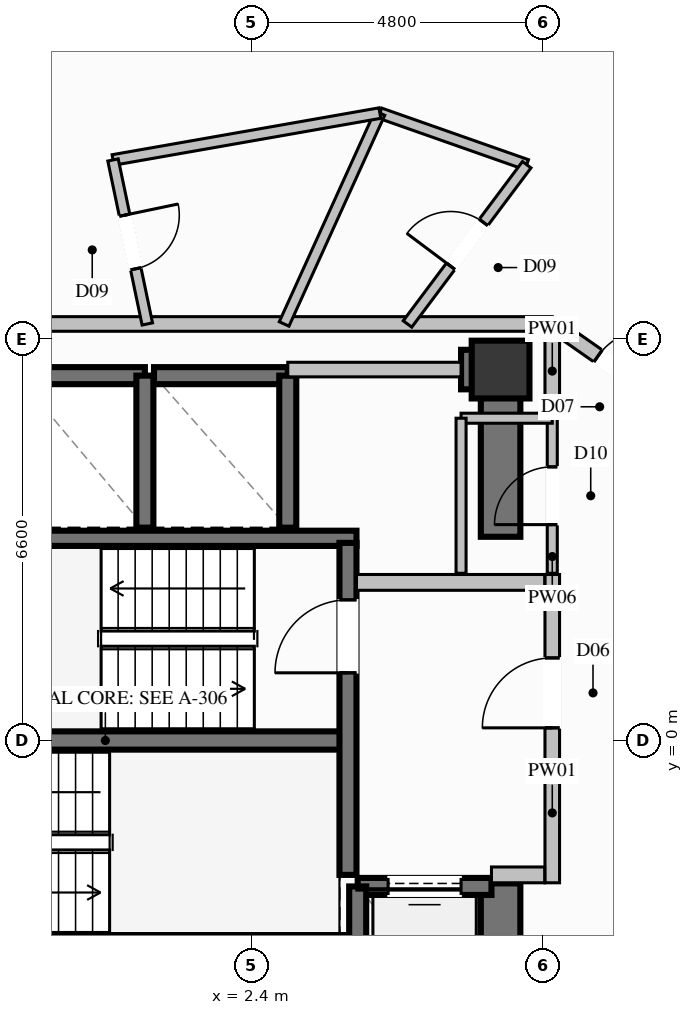
"""IFC4 building model, lengths in metres.
Left out: names, types, materials, properties, quantities, classifications, styles, units other than length and angle.
Written with IfcOpenShell. Run it as: python <this file> out.ifc"""

import sys

from ifc_helpers import new_model, si_unit, direction, frame, frame_2d, origin, origin_2d, place, context, subcontext, project, spatial, rectangle, extrude, element, fill, save


model = new_model("IFC4")
c1 = context("Model", 3, precision=1e-05, world=origin(), true_north=direction((0.0, 1.0)))
c2 = subcontext(c1, "Body", "Model", "MODEL_VIEW")
j1 = project(units=[si_unit("LENGTHUNIT", "METRE"), si_unit("PLANEANGLEUNIT", "RADIAN")], contexts=[c1])
p1 = place(None, origin())
s1 = spatial("IfcSite", under=j1, at=p1, CompositionType="ELEMENT")
p2 = place(p1, origin())
s2 = spatial("IfcBuilding", under=s1, at=p2, CompositionType="ELEMENT")
p3 = place(p2, frame((0.0, 0.0, 145.8)))
s3 = spatial("IfcBuildingStorey", under=s2, at=p3, CompositionType="ELEMENT", Elevation=145.8)
p4 = place(p3, frame((6.5, 6.1, 0.0), z_axis=(0.0, 0.0, 1.0), x_axis=(1.0, 0.0, 0.0)))
e1 = element("IfcColumn", 1, at=p4, inside=s3, PredefinedType="COLUMN", context=c2, shape_type="SweptSolid", body=[
    extrude(rectangle(XDim=0.95, YDim=0.95, at=origin_2d()), origin(), (0.0, 0.0, 1.0), 3.6),
])
p5 = place(p3, frame((-3.99, 0.0, 0.0), z_axis=(0.0, 0.0, 1.0), x_axis=(1.0, 0.0, 0.0)))
e2 = element("IfcWall", 2, at=p5, inside=s3, PredefinedType="SHEAR", context=c2, shape_type="SweptSolid", body=[
    extrude(rectangle(XDim=7.98, YDim=0.3, at=frame_2d((3.99, 0.0))), origin(), (0.0, 0.0, 1.0), 3.6),
])
for number, where, z_axis, x_axis in (
    (3, (-4.13, -3.325, 0.0), (0.0, 0.0, 1.0), (1.0, 0.0, 0.0)),
    (4, (-4.13, 3.325, 0.0), (0.0, 0.0, 1.0), (1.0, 0.0, 0.0)),
):
    element("IfcWall", number, at=place(p3, frame(where, z_axis=z_axis, x_axis=x_axis)), inside=s3, PredefinedType="SOLIDWALL", context=c2, shape_type="SweptSolid", body=[
        extrude(rectangle(XDim=8.26, YDim=0.25, at=frame_2d((4.13, 0.0))), origin(), (0.0, 0.0, 1.0), 3.6),
    ])
p6 = place(p3, frame((5.85, 6.1, 0.0), z_axis=(0.0, 0.0, 1.0), x_axis=(1.0, 0.0, 0.0)))
e5 = element("IfcWall", 5, at=p6, inside=s3, PredefinedType="SHEAR", context=c2, shape_type="SweptSolid", body=[
    extrude(rectangle(XDim=0.325, YDim=0.65, at=frame_2d((0.163, 0.0))), origin(), (0.0, 0.0, 1.0), 3.6),
])
p7 = place(p3, frame((6.5, -6.425, 0.0), z_axis=(0.0, 0.0, 1.0), x_axis=(0.0, 1.0, 0.0)))
e6 = element("IfcWall", 6, at=p7, inside=s3, PredefinedType="SHEAR", context=c2, shape_type="SweptSolid", body=[
    extrude(rectangle(XDim=4.075, YDim=0.65, at=frame_2d((2.038, 0.0))), origin(), (0.0, 0.0, 1.0), 3.6),
])
p8 = place(p3, frame((6.5, 3.35, 0.0), z_axis=(0.0, 0.0, 1.0), x_axis=(0.0, 1.0, 0.0)))
e7 = element("IfcWall", 7, at=p8, inside=s3, PredefinedType="SHEAR", context=c2, shape_type="SweptSolid", body=[
    extrude(rectangle(XDim=3.075, YDim=0.65, at=frame_2d((1.538, 0.0))), origin(), (0.0, 0.0, 1.0), 3.6),
])
p9 = place(p3, frame((0.65, 6.0, 0.0), z_axis=(0.0, 0.0, 1.0), x_axis=(-1.0, 0.0, 0.0)))
e8 = element("IfcWall", 8, at=p9, inside=s3, PredefinedType="SOLIDWALL", context=c2, shape_type="SweptSolid", body=[
    extrude(rectangle(XDim=2.1, YDim=0.28, at=frame_2d((1.05, 0.0))), origin(), (0.0, 0.0, 1.0), 3.35),
])
p10 = place(p3, frame((0.65, 3.5, 0.0), z_axis=(0.0, 0.0, 1.0), x_axis=(0.0, 1.0, 0.0)))
e9 = element("IfcWall", 9, at=p10, inside=s3, PredefinedType="SOLIDWALL", context=c2, shape_type="SweptSolid", body=[
    extrude(rectangle(XDim=2.5, YDim=0.28, at=frame_2d((1.25, 0.0))), origin(), (0.0, 0.0, 1.0), 3.35),
])
p11 = place(p3, frame((3.0, 6.0, 0.0), z_axis=(0.0, 0.0, 1.0), x_axis=(-1.0, 0.0, 0.0)))
e10 = element("IfcWall", 10, at=p11, inside=s3, PredefinedType="SOLIDWALL", context=c2, shape_type="SweptSolid", body=[
    extrude(rectangle(XDim=2.2, YDim=0.28, at=frame_2d((1.1, 0.0))), origin(), (0.0, 0.0, 1.0), 3.35),
])
p12 = place(p3, frame((3.0, 3.5, 0.0), z_axis=(0.0, 0.0, 1.0), x_axis=(0.0, 1.0, 0.0)))
e11 = element("IfcWall", 11, at=p12, inside=s3, PredefinedType="SOLIDWALL", context=c2, shape_type="SweptSolid", body=[
    extrude(rectangle(XDim=2.5, YDim=0.28, at=frame_2d((1.25, 0.0))), origin(), (0.0, 0.0, 1.0), 3.35),
])
p13 = place(p3, frame((6.35, -2.4, 0.0), z_axis=(0.0, 0.0, 1.0), x_axis=(-1.0, 0.0, 0.0)))
e12 = element("IfcWall", 12, at=p13, inside=s3, PredefinedType="SOLIDWALL", context=c2, shape_type="SweptSolid", body=[
    extrude(rectangle(XDim=2.2, YDim=0.28, at=frame_2d((1.1, 0.0))), origin(), (0.0, 0.0, 1.0), 3.35),
])
p14 = place(p13, frame((0.5, 0.0, 0.0)))
e13 = element("IfcOpeningElement", 13, at=p14, cuts=e12, PredefinedType="OPENING", context=c2, shape_type="SweptSolid", body=[
    extrude(rectangle(XDim=1.2, YDim=2.2, at=frame_2d((0.6, 1.1))), frame((0.0, 0.15, 0.0), z_axis=(0.0, -1.0, 0.0), x_axis=(1.0, 0.0, 0.0)), (0.0, 0.0, 1.0), 0.3),
])
p15 = place(p3, frame((4.15, -2.4, 0.0), z_axis=(0.0, 0.0, 1.0), x_axis=(0.0, -1.0, 0.0)))
e14 = element("IfcWall", 14, at=p15, inside=s3, PredefinedType="SOLIDWALL", context=c2, shape_type="SweptSolid", body=[
    extrude(rectangle(XDim=2.7, YDim=0.28, at=frame_2d((1.35, 0.0))), origin(), (0.0, 0.0, 1.0), 3.35),
])
p16 = place(p3, frame((3.99, -2.21, 0.0), z_axis=(0.0, 0.0, 1.0), x_axis=(0.0, 1.0, 0.0)))
e15 = element("IfcWall", 15, at=p16, inside=s3, PredefinedType="SOLIDWALL", context=c2, shape_type="SweptSolid", body=[
    extrude(rectangle(XDim=5.46, YDim=0.28, at=frame_2d((2.73, 0.0))), origin(), (0.0, 0.0, 1.0), 3.35),
])
p17 = place(p16, frame((3.323, 0.0, 0.0)))
e16 = element("IfcOpeningElement", 16, at=p17, cuts=e15, PredefinedType="OPENING", context=c2, shape_type="SweptSolid", body=[
    extrude(rectangle(XDim=1.2, YDim=2.2, at=frame_2d((0.6, 1.1))), frame((0.0, 0.15, 0.0), z_axis=(0.0, -1.0, 0.0), x_axis=(1.0, 0.0, 0.0)), (0.0, 0.0, 1.0), 0.3),
])
p18 = place(p3, frame((7.35, -2.34, 0.0), z_axis=(0.0, 0.0, 1.0), x_axis=(0.0, 1.0, 0.0)))
e17 = element("IfcWall", 17, at=p18, inside=s3, PredefinedType="PARTITIONING", context=c2, shape_type="SweptSolid", body=[
    extrude(rectangle(XDim=5.07, YDim=0.24, at=frame_2d((2.535, 0.0))), origin(), (0.0, 0.0, 1.0), 2.435),
])
p19 = place(p18, frame((2.548, 0.0, 0.0)))
e18 = element("IfcOpeningElement", 18, at=p19, cuts=e17, PredefinedType="OPENING", context=c2, shape_type="SweptSolid", body=[
    extrude(rectangle(XDim=1.15, YDim=2.2, at=frame_2d((0.575, 1.1))), frame((0.0, 0.13, 0.0), z_axis=(0.0, -1.0, 0.0), x_axis=(1.0, 0.0, 0.0)), (0.0, 0.0, 1.0), 0.26),
])
p20 = place(p3, frame((6.35, -2.21, 0.0), z_axis=(0.0, 0.0, 1.0), x_axis=(1.0, 0.0, 0.0)))
e19 = element("IfcWall", 19, at=p20, inside=s3, PredefinedType="PARTITIONING", context=c2, shape_type="SweptSolid", body=[
    extrude(rectangle(XDim=0.875, YDim=0.26, at=frame_2d((0.438, 0.0))), origin(), (0.0, 0.0, 1.0), 3.35),
])
p21 = place(p3, frame((4.13, 2.6, 0.0), z_axis=(0.0, 0.0, 1.0), x_axis=(1.0, 0.0, 0.0)))
e20 = element("IfcWall", 20, at=p21, inside=s3, PredefinedType="PARTITIONING", context=c2, shape_type="SweptSolid", body=[
    extrude(rectangle(XDim=3.095, YDim=0.26, at=frame_2d((1.548, 0.0))), origin(), (0.0, 0.0, 1.0), 3.35),
])
p22 = place(p3, frame((-7.35, 6.85, 0.0), z_axis=(0.0, 0.0, 1.0), x_axis=(1.0, 0.0, 0.0)))
e21 = element("IfcWall", 21, at=p22, inside=s3, PredefinedType="PARTITIONING", context=c2, shape_type="SweptSolid", body=[
    extrude(rectangle(XDim=14.7, YDim=0.24, at=frame_2d((7.35, 0.0))), origin(), (0.0, 0.0, 1.0), 2.435),
])
p23 = place(p3, frame((7.35, 5.3, 0.0), z_axis=(0.0, 0.0, 1.0), x_axis=(0.0, 1.0, 0.0)))
e22 = element("IfcWall", 22, at=p23, inside=s3, PredefinedType="PARTITIONING", context=c2, shape_type="SweptSolid", body=[
    extrude(rectangle(XDim=1.55, YDim=0.24, at=frame_2d((0.775, 0.0))), origin(), (0.0, 0.0, 1.0), 2.435),
])
p24 = place(p3, frame((3.0, 6.1, 0.0), z_axis=(0.0, 0.0, 1.0), x_axis=(1.0, 0.0, 0.0)))
e23 = element("IfcWall", 23, at=p24, inside=s3, PredefinedType="PARTITIONING", context=c2, shape_type="SweptSolid", body=[
    extrude(rectangle(XDim=2.85, YDim=0.24, at=frame_2d((1.425, 0.0))), origin(), (0.0, 0.0, 1.0), 2.435),
])
p25 = place(p3, frame((7.35, 2.75, 0.0), z_axis=(0.0, 0.0, 1.0), x_axis=(0.0, 1.0, 0.0)))
e24 = element("IfcWall", 24, at=p25, inside=s3, PredefinedType="PARTITIONING", context=c2, shape_type="SweptSolid", body=[
    extrude(rectangle(XDim=2.55, YDim=0.165, at=frame_2d((1.275, 0.0))), origin(), (0.0, 0.0, 1.0), 3.35),
])
p26 = place(p25, frame((0.8, 0.0, 0.0)))
e25 = element("IfcOpeningElement", 25, at=p26, cuts=e24, PredefinedType="OPENING", context=c2, shape_type="SweptSolid", body=[
    extrude(rectangle(XDim=0.95, YDim=2.1, at=frame_2d((0.475, 1.05))), frame((0.0, 0.093, 0.0), z_axis=(0.0, -1.0, 0.0), x_axis=(1.0, 0.0, 0.0)), (0.0, 0.0, 1.0), 0.185),
])
p27 = place(p3, frame((7.35, 5.3, 0.0), z_axis=(0.0, 0.0, 1.0), x_axis=(-1.0, 0.0, 0.0)))
e26 = element("IfcWall", 26, at=p27, inside=s3, PredefinedType="PARTITIONING", context=c2, shape_type="SweptSolid", body=[
    extrude(rectangle(XDim=1.5, YDim=0.165, at=frame_2d((0.75, 0.0))), origin(), (0.0, 0.0, 1.0), 2.435),
])
p28 = place(p3, frame((5.85, 5.3, 0.0), z_axis=(0.0, 0.0, 1.0), x_axis=(0.0, -1.0, 0.0)))
e27 = element("IfcWall", 27, at=p28, inside=s3, PredefinedType="PARTITIONING", context=c2, shape_type="SweptSolid", body=[
    extrude(rectangle(XDim=2.55, YDim=0.165, at=frame_2d((1.275, 0.0))), origin(), (0.0, 0.0, 1.0), 2.435),
])
p29 = place(p3, frame((4.515, 10.318, 0.0), z_axis=(0.0, 0.0, 1.0), x_axis=(0.943387567364, -0.331692474655, 0.0)))
e28 = element("IfcWall", 28, at=p29, inside=s3, PredefinedType="PLUMBINGWALL", context=c2, shape_type="SweptSolid", body=[
    extrude(rectangle(XDim=2.56, YDim=0.175, at=frame_2d((1.28, 0.0))), origin(), (0.0, 0.0, 1.0), 3.35),
])
p30 = place(p3, frame((4.515, 10.318, 0.0), z_axis=(0.0, 0.0, 1.0), x_axis=(-0.413493846923, -0.910506912965, 0.0)))
e29 = element("IfcWall", 29, at=p30, inside=s3, PredefinedType="PLUMBINGWALL", context=c2, shape_type="SweptSolid", body=[
    extrude(rectangle(XDim=3.809, YDim=0.175, at=frame_2d((1.904, 0.0))), origin(), (0.0, 0.0, 1.0), 3.35),
])
p31 = place(p3, frame((4.969, 6.85, 0.0), z_axis=(0.0, 0.0, 1.0), x_axis=(0.599367014453, 0.800474348112, 0.0)))
e30 = element("IfcWall", 30, at=p31, inside=s3, PredefinedType="PLUMBINGWALL", context=c2, shape_type="SweptSolid", body=[
    extrude(rectangle(XDim=3.272, YDim=0.175, at=frame_2d((1.636, 0.0))), origin(), (0.0, 0.0, 1.0), 2.791),
])
p32 = place(p31, frame((1.186, 0.0, 0.0)))
e31 = element("IfcOpeningElement", 31, at=p32, cuts=e30, PredefinedType="OPENING", context=c2, shape_type="SweptSolid", body=[
    extrude(rectangle(XDim=0.9, YDim=2.1, at=frame_2d((0.45, 1.05))), frame((0.0, 0.098, 0.0), z_axis=(0.0, -1.0, 0.0), x_axis=(1.0, 0.0, 0.0)), (0.0, 0.0, 1.0), 0.195),
])
p33 = place(p3, frame((7.35, 6.85, 0.0), z_axis=(0.0, 0.0, 1.0), x_axis=(0.819753050647, -0.57271715179, 0.0)))
e32 = element("IfcWall", 32, at=p33, inside=s3, PredefinedType="PARTITIONING", context=c2, shape_type="SweptSolid", body=[
    extrude(rectangle(XDim=2.837, YDim=0.24, at=frame_2d((1.419, 0.0))), origin(), (0.0, 0.0, 1.0), 3.35),
])
p34 = place(p33, frame((0.919, 0.0, 0.0)))
e33 = element("IfcOpeningElement", 33, at=p34, cuts=e32, PredefinedType="OPENING", context=c2, shape_type="SweptSolid", body=[
    extrude(rectangle(XDim=1.0, YDim=2.2, at=frame_2d((0.5, 1.1))), frame((0.0, 0.13, 0.0), z_axis=(0.0, -1.0, 0.0), x_axis=(1.0, 0.0, 0.0)), (0.0, 0.0, 1.0), 0.26),
])
p35 = place(p3, frame((0.126, 9.547, 0.0), z_axis=(0.0, 0.0, 1.0), x_axis=(0.984918391832, 0.173019540602, 0.0)))
e34 = element("IfcWall", 34, at=p35, inside=s3, PredefinedType="PLUMBINGWALL", context=c2, shape_type="SweptSolid", body=[
    extrude(rectangle(XDim=4.456, YDim=0.175, at=frame_2d((2.228, 0.0))), origin(), (0.0, 0.0, 1.0), 3.35),
])
p36 = place(p3, frame((0.126, 9.547, 0.0), z_axis=(0.0, 0.0, 1.0), x_axis=(0.204679557322, -0.978829034518, 0.0)))
e35 = element("IfcWall", 35, at=p36, inside=s3, PredefinedType="PLUMBINGWALL", context=c2, shape_type="SweptSolid", body=[
    extrude(rectangle(XDim=2.755, YDim=0.175, at=frame_2d((1.378, 0.0))), origin(), (0.0, 0.0, 1.0), 3.35),
])
p37 = place(p36, frame((0.928, 0.0, 0.0)))
e36 = element("IfcOpeningElement", 36, at=p37, cuts=e35, PredefinedType="OPENING", context=c2, shape_type="SweptSolid", body=[
    extrude(rectangle(XDim=0.9, YDim=2.1, at=frame_2d((0.45, 1.05))), frame((0.0, 0.098, 0.0), z_axis=(0.0, -1.0, 0.0), x_axis=(1.0, 0.0, 0.0)), (0.0, 0.0, 1.0), 0.195),
])
p38 = place(p14, origin())
e37 = element("IfcDoor", 37, at=p38, inside=s3, OperationType="SLIDING_TO_LEFT", PredefinedType="DOOR", context=c2, shape_type="SweptSolid", body=[
    extrude(rectangle(XDim=1.2, YDim=2.2, at=frame_2d((0.6, 1.1))), frame((0.0, 0.025, 0.0), z_axis=(0.0, -1.0, 0.0), x_axis=(1.0, 0.0, 0.0)), (0.0, 0.0, 1.0), 0.05),
])
fill(e13, e37)
p39 = place(p17, origin())
e38 = element("IfcDoor", 38, at=p39, inside=s3, OperationType="SINGLE_SWING_LEFT", PredefinedType="DOOR", context=c2, shape_type="SweptSolid", body=[
    extrude(rectangle(XDim=1.2, YDim=2.2, at=frame_2d((0.6, 1.1))), frame((0.0, 0.025, 0.0), z_axis=(0.0, -1.0, 0.0), x_axis=(1.0, 0.0, 0.0)), (0.0, 0.0, 1.0), 0.05),
])
fill(e16, e38)
p40 = place(p19, origin())
e39 = element("IfcDoor", 39, at=p40, inside=s3, OperationType="SINGLE_SWING_LEFT", PredefinedType="DOOR", context=c2, shape_type="SweptSolid", body=[
    extrude(rectangle(XDim=1.15, YDim=2.2, at=frame_2d((0.575, 1.1))), frame((0.0, 0.025, 0.0), z_axis=(0.0, -1.0, 0.0), x_axis=(1.0, 0.0, 0.0)), (0.0, 0.0, 1.0), 0.05),
])
fill(e18, e39)
p41 = place(p26, origin())
e40 = element("IfcDoor", 40, at=p41, inside=s3, OperationType="SINGLE_SWING_LEFT", PredefinedType="DOOR", context=c2, shape_type="SweptSolid", body=[
    extrude(rectangle(XDim=0.95, YDim=2.1, at=frame_2d((0.475, 1.05))), frame((0.0, 0.025, 0.0), z_axis=(0.0, -1.0, 0.0), x_axis=(1.0, 0.0, 0.0)), (0.0, 0.0, 1.0), 0.05),
])
fill(e25, e40)
p42 = place(p32, origin())
e41 = element("IfcDoor", 41, at=p42, inside=s3, OperationType="SINGLE_SWING_LEFT", PredefinedType="DOOR", context=c2, shape_type="SweptSolid", body=[
    extrude(rectangle(XDim=0.9, YDim=2.1, at=frame_2d((0.45, 1.05))), frame((0.0, 0.025, 0.0), z_axis=(0.0, -1.0, 0.0), x_axis=(1.0, 0.0, 0.0)), (0.0, 0.0, 1.0), 0.05),
])
fill(e31, e41)
p43 = place(p34, origin())
e42 = element("IfcDoor", 42, at=p43, inside=s3, OperationType="SINGLE_SWING_RIGHT", PredefinedType="DOOR", context=c2, shape_type="SweptSolid", body=[
    extrude(rectangle(XDim=1.0, YDim=2.2, at=frame_2d((0.5, 1.1))), frame((0.0, 0.025, 0.0), z_axis=(0.0, -1.0, 0.0), x_axis=(1.0, 0.0, 0.0)), (0.0, 0.0, 1.0), 0.05),
])
fill(e33, e42)
p44 = place(p37, origin())
e43 = element("IfcDoor", 43, at=p44, inside=s3, OperationType="SINGLE_SWING_LEFT", PredefinedType="DOOR", context=c2, shape_type="SweptSolid", body=[
    extrude(rectangle(XDim=0.9, YDim=2.1, at=frame_2d((0.45, 1.05))), frame((0.0, 0.025, 0.0), z_axis=(0.0, -1.0, 0.0), x_axis=(1.0, 0.0, 0.0)), (0.0, 0.0, 1.0), 0.05),
])
fill(e36, e43)
save(model, sys.argv[1])
